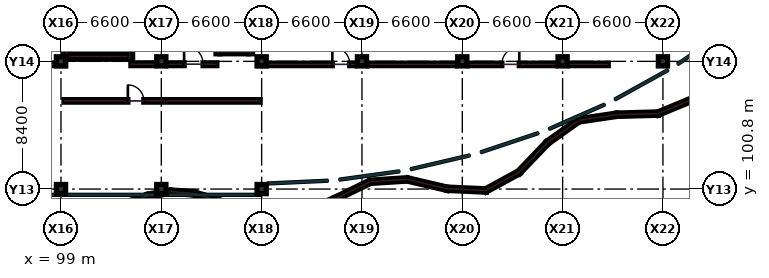
"""IFC4 building model, lengths in metres.
Left out: names, types, materials, properties, quantities, classifications, styles, units other than length and angle.
Written with IfcOpenShell. Run it as: python <this file> out.ifc"""

import sys

from ifc_helpers import new_model, si_unit, direction, frame, frame_2d, origin, origin_2d, place, context, subcontext, project, spatial, rectangle, extrude, element, fill, save


model = new_model("IFC4")
c1 = context("Model", 3, precision=1e-05, world=origin(), true_north=direction((0.0, 1.0)))
c2 = subcontext(c1, "Body", "Model", "MODEL_VIEW")
j1 = project(units=[si_unit("LENGTHUNIT", "METRE"), si_unit("PLANEANGLEUNIT", "RADIAN")], contexts=[c1])
p1 = place(None, origin())
s1 = spatial("IfcSite", under=j1, at=p1, CompositionType="ELEMENT")
p2 = place(p1, origin())
s2 = spatial("IfcBuilding", under=s1, at=p2, CompositionType="ELEMENT")
p3 = place(p2, frame((0.0, 0.0, 9.9)))
s3 = spatial("IfcBuildingStorey", under=s2, at=p3, CompositionType="ELEMENT", Elevation=9.9)
for number, where, z_axis, x_axis in (
    (1, (99.0, 100.8, 0.0), (0.0, 0.0, 1.0), (1.0, 0.0, 0.0)),
    (2, (99.0, 109.2, 0.0), (0.0, 0.0, 1.0), (1.0, 0.0, 0.0)),
    (3, (105.6, 100.8, 0.0), (0.0, 0.0, 1.0), (1.0, 0.0, 0.0)),
    (4, (105.6, 109.2, 0.0), (0.0, 0.0, 1.0), (1.0, 0.0, 0.0)),
    (5, (112.2, 100.8, 0.0), (0.0, 0.0, 1.0), (1.0, 0.0, 0.0)),
    (6, (112.2, 109.2, 0.0), (0.0, 0.0, 1.0), (1.0, 0.0, 0.0)),
    (7, (118.8, 109.2, 0.0), (0.0, 0.0, 1.0), (1.0, 0.0, 0.0)),
    (8, (125.4, 109.2, 0.0), (0.0, 0.0, 1.0), (1.0, 0.0, 0.0)),
    (9, (132.0, 109.2, 0.0), (0.0, 0.0, 1.0), (1.0, 0.0, 0.0)),
    (10, (138.6, 109.2, 0.0), (0.0, 0.0, 1.0), (1.0, 0.0, 0.0)),
):
    element("IfcColumn", number, at=place(p3, frame(where, z_axis=z_axis, x_axis=x_axis)), inside=s3, PredefinedType="COLUMN", context=c2, shape_type="SweptSolid", body=[
        extrude(rectangle(XDim=0.6, YDim=0.6, at=origin_2d()), origin(), (0.0, 0.0, 1.0), 4.5),
    ])
p4 = place(p3, frame((92.85, 109.0, 0.0), z_axis=(0.0, 0.0, 1.0), x_axis=(1.0, 0.0, 0.0)))
e11 = element("IfcWall", 11, at=p4, inside=s3, PredefinedType="PARTITIONING", context=c2, shape_type="SweptSolid", body=[
    extrude(rectangle(XDim=6.45, YDim=0.16, at=frame_2d((3.225, 0.0))), origin(), (0.0, 0.0, 1.0), 3.475),
])
p5 = place(p3, frame((112.0, 109.0, 0.0), z_axis=(0.0, 0.0, 1.0), x_axis=(1.0, 0.0, 0.0)))
e12 = element("IfcWall", 12, at=p5, inside=s3, PredefinedType="PARTITIONING", context=c2, shape_type="SweptSolid", body=[
    extrude(rectangle(XDim=6.35, YDim=0.16, at=frame_2d((3.175, 0.0))), origin(), (0.0, 0.0, 1.0), 3.475),
])
p6 = place(p5, frame((4.85, 0.0, 0.0)))
e13 = element("IfcOpeningElement", 13, at=p6, cuts=e12, PredefinedType="OPENING", context=c2, shape_type="SweptSolid", body=[
    extrude(rectangle(XDim=1.15, YDim=2.2, at=frame_2d((0.575, 1.1))), frame((0.0, 0.09, 0.0), z_axis=(0.0, -1.0, 0.0), x_axis=(1.0, 0.0, 0.0)), (0.0, 0.0, 1.0), 0.18),
])
p7 = place(p3, frame((119.25, 109.0, 0.0), z_axis=(0.0, 0.0, 1.0), x_axis=(1.0, 0.0, 0.0)))
e14 = element("IfcWall", 14, at=p7, inside=s3, PredefinedType="PARTITIONING", context=c2, shape_type="SweptSolid", body=[
    extrude(rectangle(XDim=5.7, YDim=0.16, at=frame_2d((2.85, 0.0))), origin(), (0.0, 0.0, 1.0), 3.475),
])
p8 = place(p3, frame((125.85, 109.0, 0.0), z_axis=(0.0, 0.0, 1.0), x_axis=(1.0, 0.0, 0.0)))
e15 = element("IfcWall", 15, at=p8, inside=s3, PredefinedType="PARTITIONING", context=c2, shape_type="SweptSolid", body=[
    extrude(rectangle(XDim=5.7, YDim=0.16, at=frame_2d((2.85, 0.0))), origin(), (0.0, 0.0, 1.0), 3.475),
])
p9 = place(p8, frame((2.15, 0.0, 0.0)))
e16 = element("IfcOpeningElement", 16, at=p9, cuts=e15, PredefinedType="OPENING", context=c2, shape_type="SweptSolid", body=[
    extrude(rectangle(XDim=1.15, YDim=2.2, at=frame_2d((0.575, 1.1))), frame((0.0, 0.09, 0.0), z_axis=(0.0, -1.0, 0.0), x_axis=(1.0, 0.0, 0.0)), (0.0, 0.0, 1.0), 0.18),
])
p10 = place(p3, frame((132.45, 109.0, 0.0), z_axis=(0.0, 0.0, 1.0), x_axis=(1.0, 0.0, 0.0)))
e17 = element("IfcWall", 17, at=p10, inside=s3, PredefinedType="PARTITIONING", context=c2, shape_type="SweptSolid", body=[
    extrude(rectangle(XDim=2.55, YDim=0.16, at=frame_2d((1.275, 0.0))), origin(), (0.0, 0.0, 1.0), 3.475),
])
p11 = place(p3, frame((99.2, 106.6, 0.0), z_axis=(0.0, 0.0, 1.0), x_axis=(1.0, 0.0, 0.0)))
e18 = element("IfcWall", 18, at=p11, inside=s3, PredefinedType="PARTITIONING", context=c2, shape_type="SweptSolid", body=[
    extrude(rectangle(XDim=12.9, YDim=0.16, at=frame_2d((6.45, 0.0))), origin(), (0.0, 0.0, 1.0), 3.49),
])
p12 = place(p11, frame((4.2, 0.0, 0.0)))
e19 = element("IfcOpeningElement", 19, at=p12, cuts=e18, PredefinedType="OPENING", context=c2, shape_type="SweptSolid", body=[
    extrude(rectangle(XDim=1.05, YDim=2.15, at=frame_2d((0.525, 1.075))), frame((0.0, 0.09, 0.0), z_axis=(0.0, -1.0, 0.0), x_axis=(1.0, 0.0, 0.0)), (0.0, 0.0, 1.0), 0.18),
])
p13 = place(p3, frame((103.185, 99.805, 0.0), z_axis=(0.0, 0.0, 1.0), x_axis=(0.940508911561, 0.339769020476, 0.0)))
e20 = element("IfcWall", 20, at=p13, inside=s3, PredefinedType="SOLIDWALL", context=c2, shape_type="SweptSolid", body=[
    extrude(rectangle(XDim=1.589, YDim=0.22, at=frame_2d((0.795, 0.0))), origin(), (0.0, 0.0, 1.0), 1.45),
])
p14 = place(p3, frame((104.705, 100.355, 0.0), z_axis=(0.0, 0.0, 1.0), x_axis=(0.983508119514, 0.180863978862, 0.0)))
e21 = element("IfcWall", 21, at=p14, inside=s3, PredefinedType="SOLIDWALL", context=c2, shape_type="SweptSolid", body=[
    extrude(rectangle(XDim=1.52, YDim=0.22, at=frame_2d((0.76, 0.0))), origin(), (0.0, 0.0, 1.0), 1.45),
])
p15 = place(p3, frame((106.235, 100.63, 0.0), z_axis=(0.0, 0.0, 1.0), x_axis=(0.997035234424, -0.076946353501, 0.0)))
e22 = element("IfcWall", 22, at=p15, inside=s3, PredefinedType="SOLIDWALL", context=c2, shape_type="SweptSolid", body=[
    extrude(rectangle(XDim=1.494, YDim=0.22, at=frame_2d((0.747, 0.0))), origin(), (0.0, 0.0, 1.0), 1.45),
])
p16 = place(p3, frame((107.755, 100.51, 0.0), z_axis=(0.0, 0.0, 1.0), x_axis=(0.957576314427, -0.288179808538, 0.0)))
e23 = element("IfcWall", 23, at=p16, inside=s3, PredefinedType="SOLIDWALL", context=c2, shape_type="SweptSolid", body=[
    extrude(rectangle(XDim=1.561, YDim=0.22, at=frame_2d((0.781, 0.0))), origin(), (0.0, 0.0, 1.0), 1.45),
])
p17 = place(p3, frame((114.62, 99.08, 0.0), z_axis=(0.0, 0.0, 1.0), x_axis=(0.91341863972, 0.407021361371, 0.0)))
e24 = element("IfcWall", 24, at=p17, inside=s3, PredefinedType="SOLIDWALL", context=c2, shape_type="SweptSolid", body=[
    extrude(rectangle(XDim=2.616, YDim=0.22, at=frame_2d((1.308, 0.0))), origin(), (0.0, 0.0, 1.0), 1.45),
])
p18 = place(p3, frame((117.005, 100.14, 0.0), z_axis=(0.0, 0.0, 1.0), x_axis=(0.898687932418, 0.438588645688, 0.0)))
e25 = element("IfcWall", 25, at=p18, inside=s3, PredefinedType="SOLIDWALL", context=c2, shape_type="SweptSolid", body=[
    extrude(rectangle(XDim=2.565, YDim=0.22, at=frame_2d((1.282, 0.0))), origin(), (0.0, 0.0, 1.0), 1.45),
])
p19 = place(p3, frame((119.36, 101.28, 0.0), z_axis=(0.0, 0.0, 1.0), x_axis=(0.997928457387, 0.064333458928, 0.0)))
e26 = element("IfcWall", 26, at=p19, inside=s3, PredefinedType="SOLIDWALL", context=c2, shape_type="SweptSolid", body=[
    extrude(rectangle(XDim=2.41, YDim=0.22, at=frame_2d((1.205, 0.0))), origin(), (0.0, 0.0, 1.0), 1.45),
])
p20 = place(p3, frame((121.805, 101.43, 0.0), z_axis=(0.0, 0.0, 1.0), x_axis=(0.973442192449, -0.228932955166, 0.0)))
e27 = element("IfcWall", 27, at=p20, inside=s3, PredefinedType="SOLIDWALL", context=c2, shape_type="SweptSolid", body=[
    extrude(rectangle(XDim=2.686, YDim=0.22, at=frame_2d((1.343, 0.0))), origin(), (0.0, 0.0, 1.0), 1.45),
])
p21 = place(p3, frame((124.395, 100.82, 0.0), z_axis=(0.0, 0.0, 1.0), x_axis=(0.999015940193, -0.044352578738, 0.0)))
e28 = element("IfcWall", 28, at=p21, inside=s3, PredefinedType="SOLIDWALL", context=c2, shape_type="SweptSolid", body=[
    extrude(rectangle(XDim=2.593, YDim=0.22, at=frame_2d((1.296, 0.0))), origin(), (0.0, 0.0, 1.0), 1.45),
])
p22 = place(p3, frame((126.915, 100.69, 0.0), z_axis=(0.0, 0.0, 1.0), x_axis=(0.877641494631, 0.479317647183, 0.0)))
e29 = element("IfcWall", 29, at=p22, inside=s3, PredefinedType="SOLIDWALL", context=c2, shape_type="SweptSolid", body=[
    extrude(rectangle(XDim=2.535, YDim=0.22, at=frame_2d((1.268, 0.0))), origin(), (0.0, 0.0, 1.0), 1.45),
])
p23 = place(p3, frame((129.105, 101.875, 0.0), z_axis=(0.0, 0.0, 1.0), x_axis=(0.692334484757, 0.721576718871, 0.0)))
e30 = element("IfcWall", 30, at=p23, inside=s3, PredefinedType="SOLIDWALL", context=c2, shape_type="SweptSolid", body=[
    extrude(rectangle(XDim=2.73, YDim=0.22, at=frame_2d((1.365, 0.0))), origin(), (0.0, 0.0, 1.0), 1.45),
])
p24 = place(p3, frame((131.015, 103.865, 0.0), z_axis=(0.0, 0.0, 1.0), x_axis=(0.814175313257, 0.580619117222, 0.0)))
e31 = element("IfcWall", 31, at=p24, inside=s3, PredefinedType="SOLIDWALL", context=c2, shape_type="SweptSolid", body=[
    extrude(rectangle(XDim=2.463, YDim=0.22, at=frame_2d((1.231, 0.0))), origin(), (0.0, 0.0, 1.0), 1.45),
])
p25 = place(p3, frame((133.08, 105.32, 0.0), z_axis=(0.0, 0.0, 1.0), x_axis=(0.989102526392, 0.147228367801, 0.0)))
e32 = element("IfcWall", 32, at=p25, inside=s3, PredefinedType="SOLIDWALL", context=c2, shape_type="SweptSolid", body=[
    extrude(rectangle(XDim=2.512, YDim=0.22, at=frame_2d((1.256, 0.0))), origin(), (0.0, 0.0, 1.0), 1.45),
])
p26 = place(p3, frame((135.58, 105.69, 0.0), z_axis=(0.0, 0.0, 1.0), x_axis=(0.999621910879, 0.027496095927, 0.0)))
e33 = element("IfcWall", 33, at=p26, inside=s3, PredefinedType="SOLIDWALL", context=c2, shape_type="SweptSolid", body=[
    extrude(rectangle(XDim=2.726, YDim=0.22, at=frame_2d((1.363, 0.0))), origin(), (0.0, 0.0, 1.0), 1.45),
])
p27 = place(p3, frame((138.255, 105.755, 0.0), z_axis=(0.0, 0.0, 1.0), x_axis=(0.923991954969, 0.382411907702, 0.0)))
e34 = element("IfcWall", 34, at=p27, inside=s3, PredefinedType="SOLIDWALL", context=c2, shape_type="SweptSolid", body=[
    extrude(rectangle(XDim=2.511, YDim=0.22, at=frame_2d((1.255, 0.0))), origin(), (0.0, 0.0, 1.0), 1.45),
])
p28 = place(p3, frame((99.37, 109.34, 0.0), z_axis=(0.0, 0.0, 1.0), x_axis=(0.0, 1.0, 0.0)))
e35 = element("IfcWall", 35, at=p28, inside=s3, PredefinedType="SHEAR", context=c2, shape_type="SweptSolid", body=[
    extrude(rectangle(XDim=8.09, YDim=0.36, at=frame_2d((4.045, 0.0))), origin(), (0.0, 0.0, 1.0), 4.24),
])
p29 = place(p3, frame((103.53, 109.34, 0.0), z_axis=(0.0, 0.0, 1.0), x_axis=(0.0, 1.0, 0.0)))
e36 = element("IfcWall", 36, at=p29, inside=s3, PredefinedType="SHEAR", context=c2, shape_type="SweptSolid", body=[
    extrude(rectangle(XDim=8.09, YDim=0.36, at=frame_2d((4.045, 0.0))), origin(), (0.0, 0.0, 1.0), 4.24),
])
p30 = place(p29, frame((0.45, 0.0, 0.0)))
e37 = element("IfcOpeningElement", 37, at=p30, cuts=e36, PredefinedType="OPENING", context=c2, shape_type="SweptSolid", body=[
    extrude(rectangle(XDim=1.25, YDim=2.15, at=frame_2d((0.625, 1.075))), frame((0.0, 0.19, 0.0), z_axis=(0.0, -1.0, 0.0), x_axis=(1.0, 0.0, 0.0)), (0.0, 0.0, 1.0), 0.38),
])
p31 = place(p3, frame((99.55, 109.52, 0.0), z_axis=(0.0, 0.0, 1.0), x_axis=(1.0, 0.0, 0.0)))
e38 = element("IfcWall", 38, at=p31, inside=s3, PredefinedType="SHEAR", context=c2, shape_type="SweptSolid", body=[
    extrude(rectangle(XDim=3.8, YDim=0.36, at=frame_2d((1.9, 0.0))), origin(), (0.0, 0.0, 1.0), 4.24),
])
p32 = place(p3, frame((109.325, 109.7, 0.0), z_axis=(0.0, 0.0, 1.0), x_axis=(0.0, 1.0, 0.0)))
e39 = element("IfcWall", 39, at=p32, inside=s3, PredefinedType="SHEAR", context=c2, shape_type="SweptSolid", body=[
    extrude(rectangle(XDim=3.2, YDim=0.25, at=frame_2d((1.6, 0.0))), origin(), (0.0, 0.0, 1.0), 4.24),
])
p33 = place(p32, frame((1.05, 0.0, 0.0)))
e40 = element("IfcOpeningElement", 40, at=p33, cuts=e39, PredefinedType="OPENING", context=c2, shape_type="SweptSolid", body=[
    extrude(rectangle(XDim=1.1, YDim=2.15, at=frame_2d((0.55, 1.075))), frame((0.0, 0.135, 0.0), z_axis=(0.0, -1.0, 0.0), x_axis=(1.0, 0.0, 0.0)), (0.0, 0.0, 1.0), 0.27),
])
p34 = place(p3, frame((111.475, 109.7, 0.0), z_axis=(0.0, 0.0, 1.0), x_axis=(0.0, 1.0, 0.0)))
e41 = element("IfcWall", 41, at=p34, inside=s3, PredefinedType="SHEAR", context=c2, shape_type="SweptSolid", body=[
    extrude(rectangle(XDim=3.2, YDim=0.25, at=frame_2d((1.6, 0.0))), origin(), (0.0, 0.0, 1.0), 4.24),
])
p35 = place(p3, frame((109.45, 109.825, 0.0), z_axis=(0.0, 0.0, 1.0), x_axis=(1.0, 0.0, 0.0)))
e42 = element("IfcWall", 42, at=p35, inside=s3, PredefinedType="SHEAR", context=c2, shape_type="SweptSolid", body=[
    extrude(rectangle(XDim=1.9, YDim=0.25, at=frame_2d((0.95, 0.0))), origin(), (0.0, 0.0, 1.0), 4.24),
])
p36 = place(p3, frame((103.6, 109.01, 0.0), z_axis=(0.0, 0.0, 1.0), x_axis=(1.0, 0.0, 0.0)))
e43 = element("IfcWall", 43, at=p36, inside=s3, PredefinedType="SOLIDWALL", context=c2, shape_type="SweptSolid", body=[
    extrude(rectangle(XDim=1.65, YDim=0.18, at=frame_2d((0.825, 0.0))), origin(), (0.0, 0.0, 1.0), 3.475),
])
p37 = place(p3, frame((105.95, 109.01, 0.0), z_axis=(0.0, 0.0, 1.0), x_axis=(1.0, 0.0, 0.0)))
e44 = element("IfcWall", 44, at=p37, inside=s3, PredefinedType="SOLIDWALL", context=c2, shape_type="SweptSolid", body=[
    extrude(rectangle(XDim=3.3, YDim=0.18, at=frame_2d((1.65, 0.0))), origin(), (0.0, 0.0, 1.0), 3.475),
])
p38 = place(p37, frame((1.15, 0.0, 0.0)))
e45 = element("IfcOpeningElement", 45, at=p38, cuts=e44, PredefinedType="OPENING", context=c2, shape_type="SweptSolid", body=[
    extrude(rectangle(XDim=1.25, YDim=2.15, at=frame_2d((0.625, 1.075))), frame((0.0, 0.1, 0.0), z_axis=(0.0, -1.0, 0.0), x_axis=(1.0, 0.0, 0.0)), (0.0, 0.0, 1.0), 0.2),
])
p39 = place(p6, origin())
e46 = element("IfcDoor", 46, at=p39, inside=s3, OperationType="SINGLE_SWING_LEFT", PredefinedType="DOOR", context=c2, shape_type="SweptSolid", body=[
    extrude(rectangle(XDim=1.15, YDim=2.2, at=frame_2d((0.575, 1.1))), frame((0.0, 0.025, 0.0), z_axis=(0.0, -1.0, 0.0), x_axis=(1.0, 0.0, 0.0)), (0.0, 0.0, 1.0), 0.05),
])
fill(e13, e46)
p40 = place(p9, origin())
e47 = element("IfcDoor", 47, at=p40, inside=s3, OperationType="SINGLE_SWING_RIGHT", PredefinedType="DOOR", context=c2, shape_type="SweptSolid", body=[
    extrude(rectangle(XDim=1.15, YDim=2.2, at=frame_2d((0.575, 1.1))), frame((0.0, 0.025, 0.0), z_axis=(0.0, -1.0, 0.0), x_axis=(1.0, 0.0, 0.0)), (0.0, 0.0, 1.0), 0.05),
])
fill(e16, e47)
p41 = place(p12, origin())
e48 = element("IfcDoor", 48, at=p41, inside=s3, OperationType="SINGLE_SWING_LEFT", PredefinedType="DOOR", context=c2, shape_type="SweptSolid", body=[
    extrude(rectangle(XDim=1.05, YDim=2.15, at=frame_2d((0.525, 1.075))), frame((0.0, 0.025, 0.0), z_axis=(0.0, -1.0, 0.0), x_axis=(1.0, 0.0, 0.0)), (0.0, 0.0, 1.0), 0.05),
])
fill(e19, e48)
p42 = place(p30, origin())
e49 = element("IfcDoor", 49, at=p42, inside=s3, OperationType="SINGLE_SWING_RIGHT", PredefinedType="DOOR", context=c2, shape_type="SweptSolid", body=[
    extrude(rectangle(XDim=1.25, YDim=2.15, at=frame_2d((0.625, 1.075))), frame((0.0, 0.025, 0.0), z_axis=(0.0, -1.0, 0.0), x_axis=(1.0, 0.0, 0.0)), (0.0, 0.0, 1.0), 0.05),
])
fill(e37, e49)
p43 = place(p38, origin())
e50 = element("IfcDoor", 50, at=p43, inside=s3, OperationType="SINGLE_SWING_LEFT", PredefinedType="DOOR", context=c2, shape_type="SweptSolid", body=[
    extrude(rectangle(XDim=1.25, YDim=2.15, at=frame_2d((0.625, 1.075))), frame((0.0, 0.025, 0.0), z_axis=(0.0, -1.0, 0.0), x_axis=(1.0, 0.0, 0.0)), (0.0, 0.0, 1.0), 0.05),
])
fill(e45, e50)
save(model, sys.argv[1])
